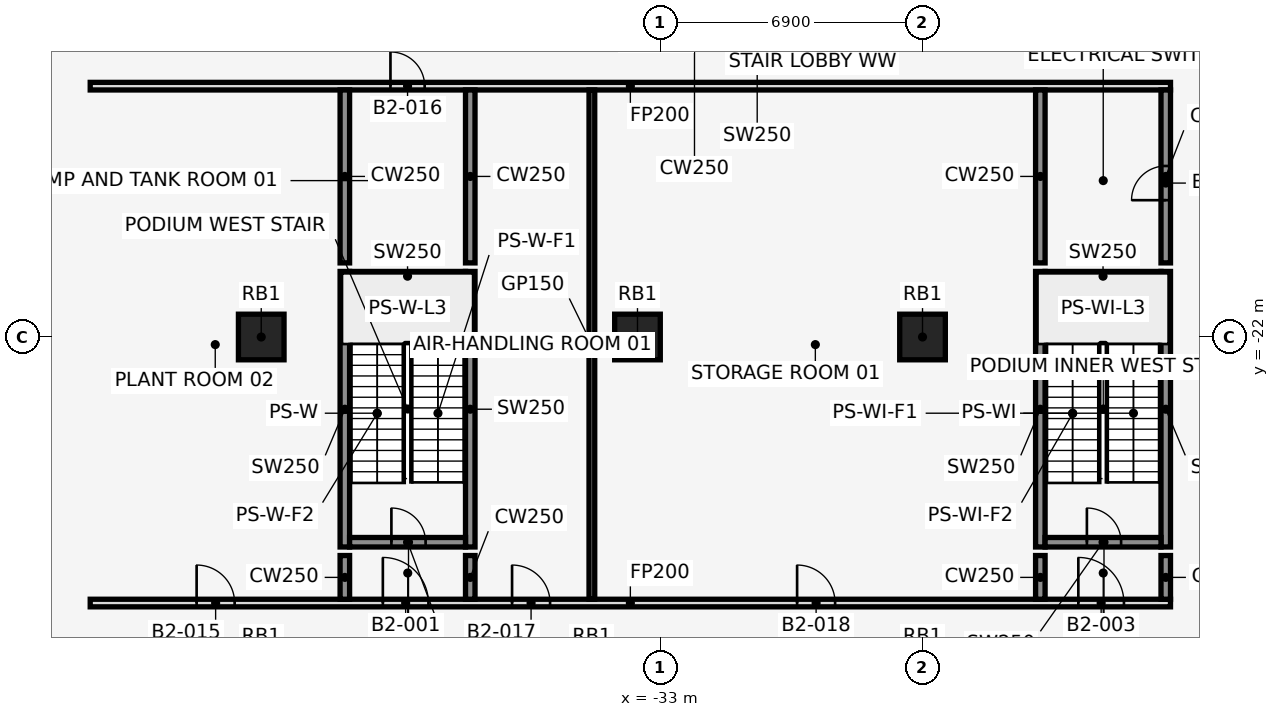
"""IFC4 building model, lengths in metres.
Left out: names, types, materials, properties, quantities, classifications, styles, units other than length and angle.
Written with IfcOpenShell. Run it as: python <this file> out.ifc"""

import sys

from ifc_helpers import new_model, si_unit, direction, frame, frame_2d, origin, origin_2d, place, context, subcontext, project, spatial, rectangle, extrude, element, fill, save


model = new_model("IFC4")
c1 = context("Model", 3, precision=1e-05, world=origin(), true_north=direction((0.0, 1.0)))
c2 = subcontext(c1, "Body", "Model", "MODEL_VIEW")
j1 = project(units=[si_unit("LENGTHUNIT", "METRE"), si_unit("PLANEANGLEUNIT", "RADIAN")], contexts=[c1])
p1 = place(None, origin())
s1 = spatial("IfcSite", under=j1, at=p1, CompositionType="ELEMENT")
p2 = place(p1, origin())
s2 = spatial("IfcBuilding", under=s1, at=p2, CompositionType="ELEMENT")
p3 = place(p2, frame((0.0, 0.0, -10.0)))
s3 = spatial("IfcBuildingStorey", under=s2, at=p3, CompositionType="ELEMENT", Elevation=-10.0)
for number, where, z_axis, x_axis in (
    (1, (-33.6, -22.0, 0.0), (0.0, 0.0, 1.0), (1.0, 0.0, 0.0)),
    (2, (-26.1, -22.0, 0.0), (0.0, 0.0, 1.0), (1.0, 0.0, 0.0)),
    (3, (-43.5, -22.0, 0.0), (0.0, 0.0, 1.0), (1.0, 0.0, 0.0)),
):
    element("IfcColumn", number, at=place(p3, frame(where, z_axis=z_axis, x_axis=x_axis)), inside=s3, PredefinedType="COLUMN", context=c2, shape_type="SweptSolid", body=[
        extrude(rectangle(XDim=1.2, YDim=1.2, at=origin_2d()), origin(), (0.0, 0.0, 1.0), 5.0),
    ])
for number, where, z_axis, x_axis in (
    (4, (-41.3, -27.525, 0.0), (0.0, 0.0, 1.0), (0.0, 1.0, 0.0)),
    (5, (-38.0, -27.525, 0.0), (0.0, 0.0, 1.0), (0.0, 1.0, 0.0)),
):
    element("IfcWall", number, at=place(p3, frame(where, z_axis=z_axis, x_axis=x_axis)), inside=s3, PredefinedType="SHEAR", context=c2, shape_type="SweptSolid", body=[
        extrude(rectangle(XDim=7.25, YDim=0.25, at=frame_2d((3.625, 0.0))), origin(), (0.0, 0.0, 1.0), 5.0),
    ])
p4 = place(p3, frame((-41.175, -27.4, 0.0), z_axis=(0.0, 0.0, 1.0), x_axis=(1.0, 0.0, 0.0)))
e6 = element("IfcWall", 6, at=p4, inside=s3, PredefinedType="SHEAR", context=c2, shape_type="SweptSolid", body=[
    extrude(rectangle(XDim=3.05, YDim=0.25, at=frame_2d((1.525, 0.0))), origin(), (0.0, 0.0, 1.0), 5.0),
])
p5 = place(p4, frame((1.1, 0.0, 0.0)))
e7 = element("IfcOpeningElement", 7, at=p5, cuts=e6, PredefinedType="OPENING", context=c2, shape_type="SweptSolid", body=[
    extrude(rectangle(XDim=0.9, YDim=2.1, at=frame_2d((0.45, 1.05))), frame((0.0, 0.137, 0.0), z_axis=(0.0, -1.0, 0.0), x_axis=(1.0, 0.0, 0.0)), (0.0, 0.0, 1.0), 0.274),
])
p6 = place(p3, frame((-41.175, -20.4, 0.0), z_axis=(0.0, 0.0, 1.0), x_axis=(1.0, 0.0, 0.0)))
e8 = element("IfcWall", 8, at=p6, inside=s3, PredefinedType="SHEAR", context=c2, shape_type="SweptSolid", body=[
    extrude(rectangle(XDim=3.05, YDim=0.25, at=frame_2d((1.525, 0.0))), origin(), (0.0, 0.0, 1.0), 5.0),
])
for number, where, z_axis, x_axis in (
    (9, (-23.0, -27.525, 0.0), (0.0, 0.0, 1.0), (0.0, 1.0, 0.0)),
    (10, (-19.7, -27.525, 0.0), (0.0, 0.0, 1.0), (0.0, 1.0, 0.0)),
):
    element("IfcWall", number, at=place(p3, frame(where, z_axis=z_axis, x_axis=x_axis)), inside=s3, PredefinedType="SHEAR", context=c2, shape_type="SweptSolid", body=[
        extrude(rectangle(XDim=7.25, YDim=0.25, at=frame_2d((3.625, 0.0))), origin(), (0.0, 0.0, 1.0), 5.0),
    ])
p7 = place(p3, frame((-22.875, -27.4, 0.0), z_axis=(0.0, 0.0, 1.0), x_axis=(1.0, 0.0, 0.0)))
e11 = element("IfcWall", 11, at=p7, inside=s3, PredefinedType="SHEAR", context=c2, shape_type="SweptSolid", body=[
    extrude(rectangle(XDim=3.05, YDim=0.25, at=frame_2d((1.525, 0.0))), origin(), (0.0, 0.0, 1.0), 5.0),
])
p8 = place(p7, frame((1.1, 0.0, 0.0)))
e12 = element("IfcOpeningElement", 12, at=p8, cuts=e11, PredefinedType="OPENING", context=c2, shape_type="SweptSolid", body=[
    extrude(rectangle(XDim=0.9, YDim=2.1, at=frame_2d((0.45, 1.05))), frame((0.0, 0.137, 0.0), z_axis=(0.0, -1.0, 0.0), x_axis=(1.0, 0.0, 0.0)), (0.0, 0.0, 1.0), 0.274),
])
p9 = place(p3, frame((-22.875, -20.4, 0.0), z_axis=(0.0, 0.0, 1.0), x_axis=(1.0, 0.0, 0.0)))
e13 = element("IfcWall", 13, at=p9, inside=s3, PredefinedType="SHEAR", context=c2, shape_type="SweptSolid", body=[
    extrude(rectangle(XDim=3.05, YDim=0.25, at=frame_2d((1.525, 0.0))), origin(), (0.0, 0.0, 1.0), 5.0),
])
p10 = place(p3, frame((-48.0, -29.0, 0.0), z_axis=(0.0, 0.0, 1.0), x_axis=(1.0, 0.0, 0.0)))
e14 = element("IfcWall", 14, at=p10, inside=s3, PredefinedType="PARTITIONING", context=c2, shape_type="SweptSolid", body=[
    extrude(rectangle(XDim=28.425, YDim=0.2, at=frame_2d((14.212, 0.0))), origin(), (0.0, 0.0, 1.0), 4.7),
])
p11 = place(p10, frame((7.7, 0.0, 0.0)))
e15 = element("IfcOpeningElement", 15, at=p11, cuts=e14, PredefinedType="OPENING", context=c2, shape_type="SweptSolid", body=[
    extrude(rectangle(XDim=1.2, YDim=2.1, at=frame_2d((0.6, 1.05))), frame((0.0, 0.112, 0.0), z_axis=(0.0, -1.0, 0.0), x_axis=(1.0, 0.0, 0.0)), (0.0, 0.0, 1.0), 0.224),
])
p12 = place(p10, frame((26.0, 0.0, 0.0)))
e16 = element("IfcOpeningElement", 16, at=p12, cuts=e14, PredefinedType="OPENING", context=c2, shape_type="SweptSolid", body=[
    extrude(rectangle(XDim=1.2, YDim=2.1, at=frame_2d((0.6, 1.05))), frame((0.0, 0.112, 0.0), z_axis=(0.0, -1.0, 0.0), x_axis=(1.0, 0.0, 0.0)), (0.0, 0.0, 1.0), 0.224),
])
p13 = place(p10, frame((2.8, 0.0, 0.0)))
e17 = element("IfcOpeningElement", 17, at=p13, cuts=e14, PredefinedType="OPENING", context=c2, shape_type="SweptSolid", body=[
    extrude(rectangle(XDim=1.0, YDim=2.1, at=frame_2d((0.5, 1.05))), frame((0.0, 0.112, 0.0), z_axis=(0.0, -1.0, 0.0), x_axis=(1.0, 0.0, 0.0)), (0.0, 0.0, 1.0), 0.224),
])
p14 = place(p10, frame((11.1, 0.0, 0.0)))
e18 = element("IfcOpeningElement", 18, at=p14, cuts=e14, PredefinedType="OPENING", context=c2, shape_type="SweptSolid", body=[
    extrude(rectangle(XDim=1.0, YDim=2.1, at=frame_2d((0.5, 1.05))), frame((0.0, 0.112, 0.0), z_axis=(0.0, -1.0, 0.0), x_axis=(1.0, 0.0, 0.0)), (0.0, 0.0, 1.0), 0.224),
])
p15 = place(p10, frame((18.6, 0.0, 0.0)))
e19 = element("IfcOpeningElement", 19, at=p15, cuts=e14, PredefinedType="OPENING", context=c2, shape_type="SweptSolid", body=[
    extrude(rectangle(XDim=1.0, YDim=2.1, at=frame_2d((0.5, 1.05))), frame((0.0, 0.112, 0.0), z_axis=(0.0, -1.0, 0.0), x_axis=(1.0, 0.0, 0.0)), (0.0, 0.0, 1.0), 0.224),
])
p16 = place(p3, frame((-48.0, -15.4, 0.0), z_axis=(0.0, 0.0, 1.0), x_axis=(1.0, 0.0, 0.0)))
e20 = element("IfcWall", 20, at=p16, inside=s3, PredefinedType="PARTITIONING", context=c2, shape_type="SweptSolid", body=[
    extrude(rectangle(XDim=28.425, YDim=0.2, at=frame_2d((14.212, 0.0))), origin(), (0.0, 0.0, 1.0), 4.7),
])
p17 = place(p16, frame((7.9, 0.0, 0.0)))
e21 = element("IfcOpeningElement", 21, at=p17, cuts=e20, PredefinedType="OPENING", context=c2, shape_type="SweptSolid", body=[
    extrude(rectangle(XDim=0.9, YDim=2.1, at=frame_2d((0.45, 1.05))), frame((0.0, 0.112, 0.0), z_axis=(0.0, -1.0, 0.0), x_axis=(1.0, 0.0, 0.0)), (0.0, 0.0, 1.0), 0.224),
])
p18 = place(p3, frame((-41.3, -28.9, 0.0), z_axis=(0.0, 0.0, 1.0), x_axis=(0.0, 1.0, 0.0)))
e22 = element("IfcWall", 22, at=p18, inside=s3, PredefinedType="SHEAR", context=c2, shape_type="SweptSolid", body=[
    extrude(rectangle(XDim=1.15, YDim=0.25, at=frame_2d((0.575, 0.0))), origin(), (0.0, 0.0, 1.0), 5.0),
])
p19 = place(p3, frame((-41.3, -20.05, 0.0), z_axis=(0.0, 0.0, 1.0), x_axis=(0.0, 1.0, 0.0)))
e23 = element("IfcWall", 23, at=p19, inside=s3, PredefinedType="SHEAR", context=c2, shape_type="SweptSolid", body=[
    extrude(rectangle(XDim=4.55, YDim=0.25, at=frame_2d((2.275, 0.0))), origin(), (0.0, 0.0, 1.0), 5.0),
])
p20 = place(p3, frame((-38.0, -28.9, 0.0), z_axis=(0.0, 0.0, 1.0), x_axis=(0.0, 1.0, 0.0)))
e24 = element("IfcWall", 24, at=p20, inside=s3, PredefinedType="SHEAR", context=c2, shape_type="SweptSolid", body=[
    extrude(rectangle(XDim=1.15, YDim=0.25, at=frame_2d((0.575, 0.0))), origin(), (0.0, 0.0, 1.0), 5.0),
])
p21 = place(p3, frame((-38.0, -20.05, 0.0), z_axis=(0.0, 0.0, 1.0), x_axis=(0.0, 1.0, 0.0)))
e25 = element("IfcWall", 25, at=p21, inside=s3, PredefinedType="SHEAR", context=c2, shape_type="SweptSolid", body=[
    extrude(rectangle(XDim=4.55, YDim=0.25, at=frame_2d((2.275, 0.0))), origin(), (0.0, 0.0, 1.0), 5.0),
])
p22 = place(p3, frame((-34.8, -28.9, 0.0), z_axis=(0.0, 0.0, 1.0), x_axis=(0.0, 1.0, 0.0)))
e26 = element("IfcWall", 26, at=p22, inside=s3, PredefinedType="PARTITIONING", context=c2, shape_type="SweptSolid", body=[
    extrude(rectangle(XDim=13.4, YDim=0.15, at=frame_2d((6.7, 0.0))), origin(), (0.0, 0.0, 1.0), 4.7),
])
p23 = place(p3, frame((-23.0, -28.9, 0.0), z_axis=(0.0, 0.0, 1.0), x_axis=(0.0, 1.0, 0.0)))
e27 = element("IfcWall", 27, at=p23, inside=s3, PredefinedType="SHEAR", context=c2, shape_type="SweptSolid", body=[
    extrude(rectangle(XDim=1.15, YDim=0.25, at=frame_2d((0.575, 0.0))), origin(), (0.0, 0.0, 1.0), 5.0),
])
p24 = place(p3, frame((-23.0, -20.05, 0.0), z_axis=(0.0, 0.0, 1.0), x_axis=(0.0, 1.0, 0.0)))
e28 = element("IfcWall", 28, at=p24, inside=s3, PredefinedType="SHEAR", context=c2, shape_type="SweptSolid", body=[
    extrude(rectangle(XDim=4.55, YDim=0.25, at=frame_2d((2.275, 0.0))), origin(), (0.0, 0.0, 1.0), 5.0),
])
p25 = place(p3, frame((-19.7, -28.9, 0.0), z_axis=(0.0, 0.0, 1.0), x_axis=(0.0, 1.0, 0.0)))
e29 = element("IfcWall", 29, at=p25, inside=s3, PredefinedType="SHEAR", context=c2, shape_type="SweptSolid", body=[
    extrude(rectangle(XDim=1.15, YDim=0.25, at=frame_2d((0.575, 0.0))), origin(), (0.0, 0.0, 1.0), 5.0),
])
p26 = place(p3, frame((-19.7, -20.05, 0.0), z_axis=(0.0, 0.0, 1.0), x_axis=(0.0, 1.0, 0.0)))
e30 = element("IfcWall", 30, at=p26, inside=s3, PredefinedType="SHEAR", context=c2, shape_type="SweptSolid", body=[
    extrude(rectangle(XDim=4.55, YDim=0.25, at=frame_2d((2.275, 0.0))), origin(), (0.0, 0.0, 1.0), 5.0),
])
p27 = place(p26, frame((1.65, 0.0, 0.0)))
e31 = element("IfcOpeningElement", 31, at=p27, cuts=e30, PredefinedType="OPENING", context=c2, shape_type="SweptSolid", body=[
    extrude(rectangle(XDim=0.9, YDim=2.1, at=frame_2d((0.45, 1.05))), frame((0.0, 0.137, 0.0), z_axis=(0.0, -1.0, 0.0), x_axis=(1.0, 0.0, 0.0)), (0.0, 0.0, 1.0), 0.274),
])
p28 = place(p11, origin())
e32 = element("IfcDoor", 32, at=p28, inside=s3, OperationType="SINGLE_SWING_LEFT", PredefinedType="DOOR", context=c2, shape_type="SweptSolid", body=[
    extrude(rectangle(XDim=1.2, YDim=2.1, at=frame_2d((0.6, 1.05))), frame((0.0, 0.025, 0.0), z_axis=(0.0, -1.0, 0.0), x_axis=(1.0, 0.0, 0.0)), (0.0, 0.0, 1.0), 0.05),
])
fill(e15, e32)
p29 = place(p5, origin())
e33 = element("IfcDoor", 33, at=p29, inside=s3, OperationType="SINGLE_SWING_LEFT", PredefinedType="DOOR", context=c2, shape_type="SweptSolid", body=[
    extrude(rectangle(XDim=0.9, YDim=2.1, at=frame_2d((0.45, 1.05))), frame((0.0, 0.025, 0.0), z_axis=(0.0, -1.0, 0.0), x_axis=(1.0, 0.0, 0.0)), (0.0, 0.0, 1.0), 0.05),
])
fill(e7, e33)
p30 = place(p12, origin())
e34 = element("IfcDoor", 34, at=p30, inside=s3, OperationType="SINGLE_SWING_RIGHT", PredefinedType="DOOR", context=c2, shape_type="SweptSolid", body=[
    extrude(rectangle(XDim=1.2, YDim=2.1, at=frame_2d((0.6, 1.05))), frame((0.0, 0.025, 0.0), z_axis=(0.0, -1.0, 0.0), x_axis=(1.0, 0.0, 0.0)), (0.0, 0.0, 1.0), 0.05),
])
fill(e16, e34)
p31 = place(p8, origin())
e35 = element("IfcDoor", 35, at=p31, inside=s3, OperationType="SINGLE_SWING_LEFT", PredefinedType="DOOR", context=c2, shape_type="SweptSolid", body=[
    extrude(rectangle(XDim=0.9, YDim=2.1, at=frame_2d((0.45, 1.05))), frame((0.0, 0.025, 0.0), z_axis=(0.0, -1.0, 0.0), x_axis=(1.0, 0.0, 0.0)), (0.0, 0.0, 1.0), 0.05),
])
fill(e12, e35)
p32 = place(p13, origin())
e36 = element("IfcDoor", 36, at=p32, inside=s3, OperationType="SINGLE_SWING_RIGHT", PredefinedType="DOOR", context=c2, shape_type="SweptSolid", body=[
    extrude(rectangle(XDim=1.0, YDim=2.1, at=frame_2d((0.5, 1.05))), frame((0.0, 0.025, 0.0), z_axis=(0.0, -1.0, 0.0), x_axis=(1.0, 0.0, 0.0)), (0.0, 0.0, 1.0), 0.05),
])
fill(e17, e36)
p33 = place(p17, frame((0.9, 0.0, 0.0), z_axis=(0.0, 0.0, 1.0), x_axis=(-1.0, 0.0, 0.0)))
e37 = element("IfcDoor", 37, at=p33, inside=s3, OperationType="SINGLE_SWING_LEFT", PredefinedType="DOOR", context=c2, shape_type="SweptSolid", body=[
    extrude(rectangle(XDim=0.9, YDim=2.1, at=frame_2d((0.45, 1.05))), frame((0.0, 0.025, 0.0), z_axis=(0.0, -1.0, 0.0), x_axis=(1.0, 0.0, 0.0)), (0.0, 0.0, 1.0), 0.05),
])
fill(e21, e37)
p34 = place(p14, origin())
e38 = element("IfcDoor", 38, at=p34, inside=s3, OperationType="SINGLE_SWING_LEFT", PredefinedType="DOOR", context=c2, shape_type="SweptSolid", body=[
    extrude(rectangle(XDim=1.0, YDim=2.1, at=frame_2d((0.5, 1.05))), frame((0.0, 0.025, 0.0), z_axis=(0.0, -1.0, 0.0), x_axis=(1.0, 0.0, 0.0)), (0.0, 0.0, 1.0), 0.05),
])
fill(e18, e38)
p35 = place(p15, origin())
e39 = element("IfcDoor", 39, at=p35, inside=s3, OperationType="SINGLE_SWING_RIGHT", PredefinedType="DOOR", context=c2, shape_type="SweptSolid", body=[
    extrude(rectangle(XDim=1.0, YDim=2.1, at=frame_2d((0.5, 1.05))), frame((0.0, 0.025, 0.0), z_axis=(0.0, -1.0, 0.0), x_axis=(1.0, 0.0, 0.0)), (0.0, 0.0, 1.0), 0.05),
])
fill(e19, e39)
p36 = place(p27, origin())
e40 = element("IfcDoor", 40, at=p36, inside=s3, OperationType="SINGLE_SWING_LEFT", PredefinedType="DOOR", context=c2, shape_type="SweptSolid", body=[
    extrude(rectangle(XDim=0.9, YDim=2.1, at=frame_2d((0.45, 1.05))), frame((0.0, 0.025, 0.0), z_axis=(0.0, -1.0, 0.0), x_axis=(1.0, 0.0, 0.0)), (0.0, 0.0, 1.0), 0.05),
])
fill(e31, e40)
save(model, sys.argv[1])
